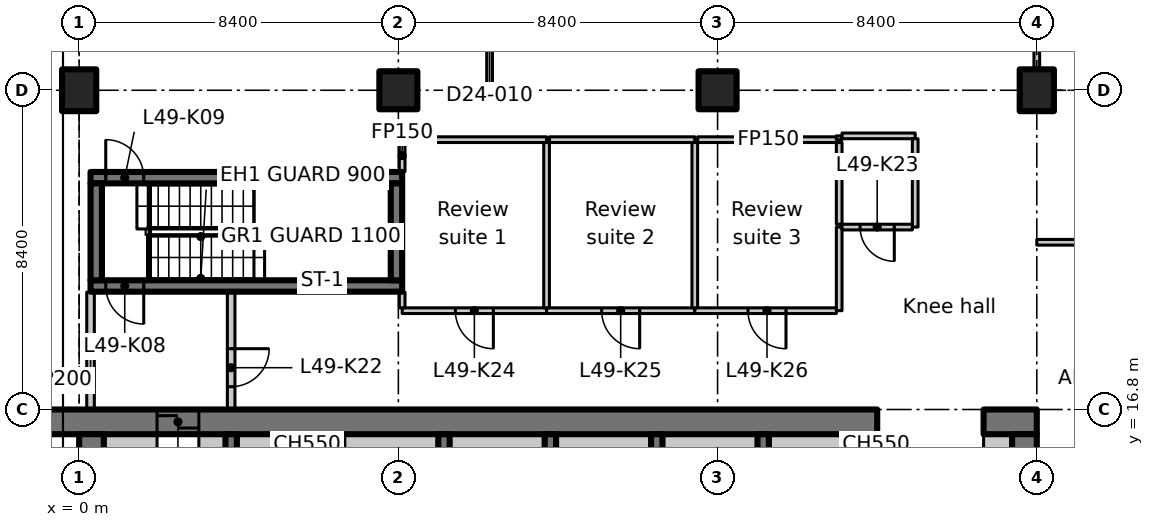
"""IFC4 building model, lengths in metres.
Left out: names, types, materials, properties, quantities, classifications, styles, units other than length and angle.
Written with IfcOpenShell. Run it as: python <this file> out.ifc"""

import sys

from ifc_helpers import new_model, si_unit, direction, frame, frame_2d, origin, origin_2d, place, context, subcontext, project, spatial, polyline, rectangle, outline, extrude, element, fill, save


model = new_model("IFC4")
c1 = context("Model", 3, precision=1e-05, world=origin(), true_north=direction((0.0, 1.0)))
c2 = subcontext(c1, "Body", "Model", "MODEL_VIEW")
j1 = project(units=[si_unit("LENGTHUNIT", "METRE"), si_unit("PLANEANGLEUNIT", "RADIAN")], contexts=[c1])
p1 = place(None, origin())
s1 = spatial("IfcSite", under=j1, at=p1, CompositionType="ELEMENT")
p2 = place(p1, origin())
s2 = spatial("IfcBuilding", under=s1, at=p2, CompositionType="ELEMENT")
p3 = place(p2, frame((0.0, 0.0, 195.6)))
s3 = spatial("IfcBuildingStorey", under=s2, at=p3, CompositionType="ELEMENT", Elevation=195.6)
p4 = place(p3, frame((0.0, 25.2, 0.0), z_axis=(0.0, 0.0, 1.0), x_axis=(1.0, 0.0, 0.0)))
e1 = element("IfcColumn", 1, at=p4, inside=s3, PredefinedType="COLUMN", context=c2, shape_type="SweptSolid", body=[
    extrude(rectangle(XDim=0.9, YDim=1.1, at=origin_2d()), origin(), (0.0, 0.0, 1.0), 3.35),
])
for number, where, z_axis, x_axis in (
    (2, (8.4, 25.2, 0.0), (0.0, 0.0, 1.0), (1.0, 0.0, 0.0)),
    (3, (16.8, 25.2, 0.0), (0.0, 0.0, 1.0), (1.0, 0.0, 0.0)),
):
    element("IfcColumn", number, at=place(p3, frame(where, z_axis=z_axis, x_axis=x_axis)), inside=s3, PredefinedType="COLUMN", context=c2, shape_type="SweptSolid", body=[
        extrude(rectangle(XDim=1.0, YDim=1.0, at=origin_2d()), origin(), (0.0, 0.0, 1.0), 3.35),
    ])
p5 = place(p3, frame((25.2, 25.2, 0.0), z_axis=(0.0, 0.0, 1.0), x_axis=(1.0, 0.0, 0.0)))
e4 = element("IfcColumn", 4, at=p5, inside=s3, PredefinedType="COLUMN", context=c2, shape_type="SweptSolid", body=[
    extrude(rectangle(XDim=0.9, YDim=1.1, at=origin_2d()), origin(), (0.0, 0.0, 1.0), 3.35),
])
p6 = place(p3, frame((-1.1, 16.475, 0.0), z_axis=(0.0, 0.0, 1.0), x_axis=(1.0, 0.0, 0.0)))
e5 = element("IfcWall", 5, at=p6, inside=s3, PredefinedType="SHEAR", context=c2, shape_type="SweptSolid", body=[
    extrude(rectangle(XDim=22.1, YDim=0.65, at=frame_2d((11.05, 0.0))), origin(), (0.0, 0.0, 1.0), 3.35),
])
p7 = place(p6, frame((3.15, 0.0, 0.0)))
e6 = element("IfcOpeningElement", 6, at=p7, cuts=e5, PredefinedType="OPENING", context=c2, shape_type="SweptSolid", body=[
    extrude(rectangle(XDim=1.1, YDim=2.3, at=frame_2d((0.55, 1.15))), frame((0.0, 0.335, 0.0), z_axis=(0.0, -1.0, 0.0), x_axis=(1.0, 0.0, 0.0)), (0.0, 0.0, 1.0), 0.67),
])
p8 = place(p3, frame((23.8, 16.475, 0.0), z_axis=(0.0, 0.0, 1.0), x_axis=(1.0, 0.0, 0.0)))
e7 = element("IfcWall", 7, at=p8, inside=s3, PredefinedType="SHEAR", context=c2, shape_type="SweptSolid", body=[
    extrude(rectangle(XDim=1.4, YDim=0.65, at=frame_2d((0.7, 0.0))), origin(), (0.0, 0.0, 1.0), 3.35),
])
p9 = place(p3, frame((0.325, 7.286, 0.0), z_axis=(0.0, 0.0, 1.0), x_axis=(0.0, 1.0, 0.0)))
e8 = element("IfcWall", 8, at=p9, inside=s3, PredefinedType="SHEAR", context=c2, shape_type="SweptSolid", body=[
    extrude(rectangle(XDim=8.864, YDim=0.65, at=frame_2d((4.432, 0.0))), origin(), (0.0, 0.0, 1.0), 3.35),
])
p10 = place(p3, frame((24.875, 12.6, 0.0), z_axis=(0.0, 0.0, 1.0), x_axis=(0.0, 1.0, 0.0)))
e9 = element("IfcWall", 9, at=p10, inside=s3, PredefinedType="SHEAR", context=c2, shape_type="SweptSolid", body=[
    extrude(rectangle(XDim=3.55, YDim=0.65, at=frame_2d((1.775, 0.0))), origin(), (0.0, 0.0, 1.0), 3.35),
])
p11 = place(p3, frame((0.65, 15.875, 0.0), z_axis=(0.0, 0.0, 1.0), x_axis=(1.0, 0.0, 0.0)))
e10 = element("IfcWall", 10, at=p11, inside=s3, PredefinedType="PARTITIONING", context=c2, shape_type="SweptSolid", body=[
    extrude(rectangle(XDim=1.4, YDim=0.55, at=frame_2d((0.7, 0.0))), origin(), (0.0, 0.0, 1.0), 3.35),
])
p12 = place(p3, frame((23.8, 15.875, 0.0), z_axis=(0.0, 0.0, 1.0), x_axis=(1.0, 0.0, 0.0)))
e11 = element("IfcWall", 11, at=p12, inside=s3, PredefinedType="PARTITIONING", context=c2, shape_type="SweptSolid", body=[
    extrude(rectangle(XDim=0.75, YDim=0.55, at=frame_2d((0.375, 0.0))), origin(), (0.0, 0.0, 1.0), 3.35),
])
for number, where, z_axis, x_axis in (
    (12, (4.0, 12.95, 0.0), (0.0, 0.0, 1.0), (0.0, 1.0, 0.0)),
    (13, (6.8, 12.95, 0.0), (0.0, 0.0, 1.0), (0.0, 1.0, 0.0)),
    (14, (9.6, 12.95, 0.0), (0.0, 0.0, 1.0), (0.0, 1.0, 0.0)),
    (15, (12.4, 12.95, 0.0), (0.0, 0.0, 1.0), (0.0, 1.0, 0.0)),
    (16, (15.2, 12.95, 0.0), (0.0, 0.0, 1.0), (0.0, 1.0, 0.0)),
    (17, (18.0, 12.95, 0.0), (0.0, 0.0, 1.0), (0.0, 1.0, 0.0)),
    (18, (20.8, 12.95, 0.0), (0.0, 0.0, 1.0), (0.0, 1.0, 0.0)),
):
    element("IfcWall", number, at=place(p3, frame(where, z_axis=z_axis, x_axis=x_axis)), inside=s3, PredefinedType="SHEAR", context=c2, shape_type="SweptSolid", body=[
        extrude(rectangle(XDim=3.2, YDim=0.3, at=frame_2d((1.6, 0.0))), origin(), (0.0, 0.0, 1.0), 3.35),
    ])
p13 = place(p3, frame((8.5, 20.05, 0.0), z_axis=(0.0, 0.0, 1.0), x_axis=(-1.0, 0.0, 0.0)))
e19 = element("IfcWall", 19, at=p13, inside=s3, PredefinedType="SHEAR", context=c2, shape_type="SweptSolid", body=[
    extrude(rectangle(XDim=8.2, YDim=0.3, at=frame_2d((4.1, 0.0))), origin(), (0.0, 0.0, 1.0), 3.35),
])
p14 = place(p13, frame((6.8, 0.0, 0.0)))
e20 = element("IfcOpeningElement", 20, at=p14, cuts=e19, PredefinedType="OPENING", context=c2, shape_type="SweptSolid", body=[
    extrude(rectangle(XDim=1.0, YDim=2.1, at=frame_2d((0.5, 1.05))), frame((0.0, 0.16, 0.0), z_axis=(0.0, -1.0, 0.0), x_axis=(1.0, 0.0, 0.0)), (0.0, 0.0, 1.0), 0.32),
])
p15 = place(p3, frame((0.3, 22.9, 0.0), z_axis=(0.0, 0.0, 1.0), x_axis=(1.0, 0.0, 0.0)))
e21 = element("IfcWall", 21, at=p15, inside=s3, PredefinedType="SHEAR", context=c2, shape_type="SweptSolid", body=[
    extrude(rectangle(XDim=8.2, YDim=0.3, at=frame_2d((4.1, 0.0))), origin(), (0.0, 0.0, 1.0), 3.35),
])
p16 = place(p15, frame((0.4, 0.0, 0.0)))
e22 = element("IfcOpeningElement", 22, at=p16, cuts=e21, PredefinedType="OPENING", context=c2, shape_type="SweptSolid", body=[
    extrude(rectangle(XDim=1.0, YDim=2.1, at=frame_2d((0.5, 1.05))), frame((0.0, 0.16, 0.0), z_axis=(0.0, -1.0, 0.0), x_axis=(1.0, 0.0, 0.0)), (0.0, 0.0, 1.0), 0.32),
])
for number, where, z_axis, x_axis in (
    (23, (0.45, 20.2, 0.0), (0.0, 0.0, 1.0), (0.0, 1.0, 0.0)),
    (24, (8.35, 20.2, 0.0), (0.0, 0.0, 1.0), (0.0, 1.0, 0.0)),
):
    element("IfcWall", number, at=place(p3, frame(where, z_axis=z_axis, x_axis=x_axis)), inside=s3, PredefinedType="SHEAR", context=c2, shape_type="SweptSolid", body=[
        extrude(rectangle(XDim=2.55, YDim=0.3, at=frame_2d((1.275, 0.0))), origin(), (0.0, 0.0, 1.0), 3.35),
    ])
p17 = place(p3, frame((0.3, 16.812, 0.0), z_axis=(0.0, 0.0, 1.0), x_axis=(0.0, 1.0, 0.0)))
e25 = element("IfcWall", 25, at=p17, inside=s3, PredefinedType="PARTITIONING", context=c2, shape_type="SweptSolid", body=[
    extrude(rectangle(XDim=3.076, YDim=0.2, at=frame_2d((1.538, 0.0))), origin(), (0.0, 0.0, 1.0), 2.98),
])
p18 = place(p3, frame((4.0, 19.888, 0.0), z_axis=(0.0, 0.0, 1.0), x_axis=(0.0, -1.0, 0.0)))
e26 = element("IfcWall", 26, at=p18, inside=s3, PredefinedType="PARTITIONING", context=c2, shape_type="SweptSolid", body=[
    extrude(rectangle(XDim=3.076, YDim=0.2, at=frame_2d((1.538, 0.0))), origin(), (0.0, 0.0, 1.0), 3.35),
])
p19 = place(p18, frame((1.488, 0.0, 0.0)))
e27 = element("IfcOpeningElement", 27, at=p19, cuts=e26, PredefinedType="OPENING", context=c2, shape_type="SweptSolid", body=[
    extrude(rectangle(XDim=1.0, YDim=2.1, at=frame_2d((0.5, 1.05))), frame((0.0, 0.11, 0.0), z_axis=(0.0, -1.0, 0.0), x_axis=(1.0, 0.0, 0.0)), (0.0, 0.0, 1.0), 0.22),
])
p20 = place(p3, frame((12.3, 19.4, 0.0), z_axis=(0.0, 0.0, 1.0), x_axis=(-1.0, 0.0, 0.0)))
e28 = element("IfcWall", 28, at=p20, inside=s3, PredefinedType="PARTITIONING", context=c2, shape_type="SweptSolid", body=[
    extrude(rectangle(XDim=3.8, YDim=0.15, at=frame_2d((1.9, 0.0))), origin(), (0.0, 0.0, 1.0), 3.35),
])
p21 = place(p20, frame((1.4, 0.0, 0.0)))
e29 = element("IfcOpeningElement", 29, at=p21, cuts=e28, PredefinedType="OPENING", context=c2, shape_type="SweptSolid", body=[
    extrude(rectangle(XDim=1.0, YDim=2.1, at=frame_2d((0.5, 1.05))), frame((0.0, 0.085, 0.0), z_axis=(0.0, -1.0, 0.0), x_axis=(1.0, 0.0, 0.0)), (0.0, 0.0, 1.0), 0.17),
])
p22 = place(p3, frame((8.5, 19.475, 0.0), z_axis=(0.0, 0.0, 1.0), x_axis=(0.0, 1.0, 0.0)))
e30 = element("IfcWall", 30, at=p22, inside=s3, PredefinedType="PARTITIONING", context=c2, shape_type="SweptSolid", body=[
    extrude(rectangle(XDim=0.413, YDim=0.15, at=frame_2d((0.207, 0.0))), origin(), (0.0, 0.0, 1.0), 3.35),
])
p23 = place(p3, frame((8.5, 23.062, 0.0), z_axis=(0.0, 0.0, 1.0), x_axis=(0.0, 1.0, 0.0)))
e31 = element("IfcWall", 31, at=p23, inside=s3, PredefinedType="PARTITIONING", context=c2, shape_type="SweptSolid", body=[
    extrude(rectangle(XDim=0.838, YDim=0.15, at=frame_2d((0.419, 0.0))), origin(), (0.0, 0.0, 1.0), 3.35),
])
p24 = place(p3, frame((8.575, 23.9, 0.0), z_axis=(0.0, 0.0, 1.0), x_axis=(1.0, 0.0, 0.0)))
e32 = element("IfcWall", 32, at=p24, inside=s3, PredefinedType="PARTITIONING", context=c2, shape_type="SweptSolid", body=[
    extrude(rectangle(XDim=3.725, YDim=0.15, at=frame_2d((1.863, 0.0))), origin(), (0.0, 0.0, 1.0), 3.35),
])
p25 = place(p3, frame((16.2, 19.4, 0.0), z_axis=(0.0, 0.0, 1.0), x_axis=(-1.0, 0.0, 0.0)))
e33 = element("IfcWall", 33, at=p25, inside=s3, PredefinedType="PARTITIONING", context=c2, shape_type="SweptSolid", body=[
    extrude(rectangle(XDim=3.9, YDim=0.15, at=frame_2d((1.95, 0.0))), origin(), (0.0, 0.0, 1.0), 3.35),
])
p26 = place(p25, frame((1.45, 0.0, 0.0)))
e34 = element("IfcOpeningElement", 34, at=p26, cuts=e33, PredefinedType="OPENING", context=c2, shape_type="SweptSolid", body=[
    extrude(rectangle(XDim=1.0, YDim=2.1, at=frame_2d((0.5, 1.05))), frame((0.0, 0.085, 0.0), z_axis=(0.0, -1.0, 0.0), x_axis=(1.0, 0.0, 0.0)), (0.0, 0.0, 1.0), 0.17),
])
p27 = place(p3, frame((12.3, 23.825, 0.0), z_axis=(0.0, 0.0, 1.0), x_axis=(0.0, -1.0, 0.0)))
e35 = element("IfcWall", 35, at=p27, inside=s3, PredefinedType="PARTITIONING", context=c2, shape_type="SweptSolid", body=[
    extrude(rectangle(XDim=4.35, YDim=0.15, at=frame_2d((2.175, 0.0))), origin(), (0.0, 0.0, 1.0), 3.35),
])
p28 = place(p3, frame((12.375, 23.9, 0.0), z_axis=(0.0, 0.0, 1.0), x_axis=(1.0, 0.0, 0.0)))
e36 = element("IfcWall", 36, at=p28, inside=s3, PredefinedType="PARTITIONING", context=c2, shape_type="SweptSolid", body=[
    extrude(rectangle(XDim=3.825, YDim=0.15, at=frame_2d((1.913, 0.0))), origin(), (0.0, 0.0, 1.0), 3.35),
])
p29 = place(p3, frame((20.0, 21.6, 0.0), z_axis=(0.0, 0.0, 1.0), x_axis=(0.0, -1.0, 0.0)))
e37 = element("IfcWall", 37, at=p29, inside=s3, PredefinedType="PARTITIONING", context=c2, shape_type="SweptSolid", body=[
    extrude(rectangle(XDim=2.2, YDim=0.15, at=frame_2d((1.1, 0.0))), origin(), (0.0, 0.0, 1.0), 3.35),
])
p30 = place(p3, frame((19.925, 19.4, 0.0), z_axis=(0.0, 0.0, 1.0), x_axis=(-1.0, 0.0, 0.0)))
e38 = element("IfcWall", 38, at=p30, inside=s3, PredefinedType="PARTITIONING", context=c2, shape_type="SweptSolid", body=[
    extrude(rectangle(XDim=3.725, YDim=0.15, at=frame_2d((1.863, 0.0))), origin(), (0.0, 0.0, 1.0), 3.35),
])
p31 = place(p30, frame((1.325, 0.0, 0.0)))
e39 = element("IfcOpeningElement", 39, at=p31, cuts=e38, PredefinedType="OPENING", context=c2, shape_type="SweptSolid", body=[
    extrude(rectangle(XDim=1.0, YDim=2.1, at=frame_2d((0.5, 1.05))), frame((0.0, 0.085, 0.0), z_axis=(0.0, -1.0, 0.0), x_axis=(1.0, 0.0, 0.0)), (0.0, 0.0, 1.0), 0.17),
])
p32 = place(p3, frame((16.2, 23.825, 0.0), z_axis=(0.0, 0.0, 1.0), x_axis=(0.0, -1.0, 0.0)))
e40 = element("IfcWall", 40, at=p32, inside=s3, PredefinedType="PARTITIONING", context=c2, shape_type="SweptSolid", body=[
    extrude(rectangle(XDim=4.35, YDim=0.15, at=frame_2d((2.175, 0.0))), origin(), (0.0, 0.0, 1.0), 3.35),
])
p33 = place(p3, frame((16.275, 23.9, 0.0), z_axis=(0.0, 0.0, 1.0), x_axis=(1.0, 0.0, 0.0)))
e41 = element("IfcWall", 41, at=p33, inside=s3, PredefinedType="PARTITIONING", context=c2, shape_type="SweptSolid", body=[
    extrude(rectangle(XDim=3.725, YDim=0.15, at=frame_2d((1.863, 0.0))), origin(), (0.0, 0.0, 1.0), 3.35),
])
p34 = place(p3, frame((20.0, 23.9, 0.0), z_axis=(0.0, 0.0, 1.0), x_axis=(0.0, 1.0, 0.0)))
e42 = element("IfcWall", 42, at=p34, inside=s3, PredefinedType="PARTITIONING", context=c2, shape_type="SweptSolid", body=[
    extrude(rectangle(XDim=0.1, YDim=0.15, at=frame_2d((0.05, 0.0))), origin(), (0.0, 0.0, 1.0), 3.35),
])
p35 = place(p3, frame((20.075, 24.0, 0.0), z_axis=(0.0, 0.0, 1.0), x_axis=(1.0, 0.0, 0.0)))
e43 = element("IfcWall", 43, at=p35, inside=s3, PredefinedType="PARTITIONING", context=c2, shape_type="SweptSolid", body=[
    extrude(rectangle(XDim=1.925, YDim=0.15, at=frame_2d((0.962, 0.0))), origin(), (0.0, 0.0, 1.0), 3.35),
])
p36 = place(p3, frame((22.0, 23.925, 0.0), z_axis=(0.0, 0.0, 1.0), x_axis=(0.0, -1.0, 0.0)))
e44 = element("IfcWall", 44, at=p36, inside=s3, PredefinedType="PARTITIONING", context=c2, shape_type="SweptSolid", body=[
    extrude(rectangle(XDim=2.325, YDim=0.15, at=frame_2d((1.163, 0.0))), origin(), (0.0, 0.0, 1.0), 3.35),
])
p37 = place(p3, frame((21.925, 21.6, 0.0), z_axis=(0.0, 0.0, 1.0), x_axis=(-1.0, 0.0, 0.0)))
e45 = element("IfcWall", 45, at=p37, inside=s3, PredefinedType="PARTITIONING", context=c2, shape_type="SweptSolid", body=[
    extrude(rectangle(XDim=1.85, YDim=0.15, at=frame_2d((0.925, 0.0))), origin(), (0.0, 0.0, 1.0), 3.35),
])
p38 = place(p37, frame((0.475, 0.0, 0.0)))
e46 = element("IfcOpeningElement", 46, at=p38, cuts=e45, PredefinedType="OPENING", context=c2, shape_type="SweptSolid", body=[
    extrude(rectangle(XDim=0.9, YDim=2.1, at=frame_2d((0.45, 1.05))), frame((0.0, 0.085, 0.0), z_axis=(0.0, -1.0, 0.0), x_axis=(1.0, 0.0, 0.0)), (0.0, 0.0, 1.0), 0.17),
])
p39 = place(p3, frame((20.0, 21.675, 0.0), z_axis=(0.0, 0.0, 1.0), x_axis=(0.0, 1.0, 0.0)))
e47 = element("IfcWall", 47, at=p39, inside=s3, PredefinedType="PARTITIONING", context=c2, shape_type="SweptSolid", body=[
    extrude(rectangle(XDim=2.15, YDim=0.15, at=frame_2d((1.075, 0.0))), origin(), (0.0, 0.0, 1.0), 3.35),
])
p40 = place(p3, frame((3.15, 15.875, 0.0), z_axis=(0.0, 0.0, 1.0), x_axis=(1.0, 0.0, 0.0)))
e48 = element("IfcWall", 48, at=p40, inside=s3, PredefinedType="PARTITIONING", context=c2, shape_type="SweptSolid", body=[
    extrude(rectangle(XDim=0.7, YDim=0.55, at=frame_2d((0.35, 0.0))), origin(), (0.0, 0.0, 1.0), 3.35),
])
for number, where, z_axis, x_axis in (
    (49, (4.15, 15.875, 0.0), (0.0, 0.0, 1.0), (1.0, 0.0, 0.0)),
    (50, (6.95, 15.875, 0.0), (0.0, 0.0, 1.0), (1.0, 0.0, 0.0)),
    (51, (9.75, 15.875, 0.0), (0.0, 0.0, 1.0), (1.0, 0.0, 0.0)),
    (52, (12.55, 15.875, 0.0), (0.0, 0.0, 1.0), (1.0, 0.0, 0.0)),
    (53, (15.35, 15.875, 0.0), (0.0, 0.0, 1.0), (1.0, 0.0, 0.0)),
    (54, (18.15, 15.875, 0.0), (0.0, 0.0, 1.0), (1.0, 0.0, 0.0)),
):
    element("IfcWall", number, at=place(p3, frame(where, z_axis=z_axis, x_axis=x_axis)), inside=s3, PredefinedType="PARTITIONING", context=c2, shape_type="SweptSolid", body=[
        extrude(rectangle(XDim=2.5, YDim=0.55, at=frame_2d((1.25, 0.0))), origin(), (0.0, 0.0, 1.0), 3.35),
    ])
p41 = place(p3, frame((20.95, 15.875, 0.0), z_axis=(0.0, 0.0, 1.0), x_axis=(1.0, 0.0, 0.0)))
e55 = element("IfcWall", 55, at=p41, inside=s3, PredefinedType="PARTITIONING", context=c2, shape_type="SweptSolid", body=[
    extrude(rectangle(XDim=0.05, YDim=0.55, at=frame_2d((0.025, 0.0))), origin(), (0.0, 0.0, 1.0), 3.35),
])
p42 = place(p3, frame((25.2, 21.2, 0.0), z_axis=(0.0, 0.0, 1.0), x_axis=(1.0, 0.0, 0.0)))
e56 = element("IfcWall", 56, at=p42, inside=s3, PredefinedType="PARTITIONING", context=c2, shape_type="SweptSolid", body=[
    extrude(rectangle(XDim=4.2, YDim=0.15, at=frame_2d((2.1, 0.0))), origin(), (0.0, 0.0, 1.0), 3.33),
])
p43 = place(p3, frame((25.2, 31.0, 0.0), z_axis=(0.0, 0.0, 1.0), x_axis=(0.0, -1.0, 0.0)))
e57 = element("IfcWall", 57, at=p43, inside=s3, PredefinedType="PARTITIONING", context=c2, shape_type="SweptSolid", body=[
    extrude(outline(polyline([(0.0, 0.0), (5.23, 0.0), (5.23, 2.98), (0.0, 2.98), (0.0, 0.0)])), frame((0.0, 0.075, 0.0), z_axis=(0.0, -1.0, 0.0), x_axis=(1.0, 0.0, 0.0)), (0.0, 0.0, 1.0), 0.15),
])
p44 = place(p43, frame((2.03, 0.0, 0.0)))
e58 = element("IfcOpeningElement", 58, at=p44, cuts=e57, PredefinedType="OPENING", context=c2, shape_type="SweptSolid", body=[
    extrude(rectangle(XDim=1.1, YDim=2.1, at=frame_2d((0.55, 1.05))), frame((0.0, 0.085, 0.0), z_axis=(0.0, -1.0, 0.0), x_axis=(1.0, 0.0, 0.0)), (0.0, 0.0, 1.0), 0.17),
])
p45 = place(p3, frame((10.8, 25.2, 0.0), z_axis=(0.0, 0.0, 1.0), x_axis=(0.0, 1.0, 0.0)))
e59 = element("IfcWall", 59, at=p45, inside=s3, PredefinedType="PARTITIONING", context=c2, shape_type="SweptSolid", body=[
    extrude(rectangle(XDim=4.2, YDim=0.15, at=frame_2d((2.1, 0.0))), origin(), (0.0, 0.0, 1.0), 3.33),
])
p46 = place(p45, frame((1.5, 0.0, 0.0)))
e60 = element("IfcOpeningElement", 60, at=p46, cuts=e59, PredefinedType="OPENING", context=c2, shape_type="SweptSolid", body=[
    extrude(rectangle(XDim=1.1, YDim=2.1, at=frame_2d((0.55, 1.05))), frame((0.0, 0.085, 0.0), z_axis=(0.0, -1.0, 0.0), x_axis=(1.0, 0.0, 0.0)), (0.0, 0.0, 1.0), 0.17),
])
p47 = place(p7, origin())
e61 = element("IfcDoor", 61, at=p47, inside=s3, OperationType="SLIDING_TO_LEFT", PredefinedType="DOOR", context=c2, shape_type="SweptSolid", body=[
    extrude(rectangle(XDim=1.1, YDim=2.3, at=frame_2d((0.55, 1.15))), frame((0.0, 0.025, 0.0), z_axis=(0.0, -1.0, 0.0), x_axis=(1.0, 0.0, 0.0)), (0.0, 0.0, 1.0), 0.05),
])
fill(e6, e61)
p48 = place(p14, origin())
e62 = element("IfcDoor", 62, at=p48, inside=s3, OperationType="SINGLE_SWING_RIGHT", PredefinedType="DOOR", context=c2, shape_type="SweptSolid", body=[
    extrude(rectangle(XDim=1.0, YDim=2.1, at=frame_2d((0.5, 1.05))), frame((0.0, 0.025, 0.0), z_axis=(0.0, -1.0, 0.0), x_axis=(1.0, 0.0, 0.0)), (0.0, 0.0, 1.0), 0.05),
])
fill(e20, e62)
p49 = place(p16, origin())
e63 = element("IfcDoor", 63, at=p49, inside=s3, OperationType="SINGLE_SWING_LEFT", PredefinedType="DOOR", context=c2, shape_type="SweptSolid", body=[
    extrude(rectangle(XDim=1.0, YDim=2.1, at=frame_2d((0.5, 1.05))), frame((0.0, 0.025, 0.0), z_axis=(0.0, -1.0, 0.0), x_axis=(1.0, 0.0, 0.0)), (0.0, 0.0, 1.0), 0.05),
])
fill(e22, e63)
p50 = place(p19, origin())
e64 = element("IfcDoor", 64, at=p50, inside=s3, OperationType="SINGLE_SWING_RIGHT", PredefinedType="DOOR", context=c2, shape_type="SweptSolid", body=[
    extrude(rectangle(XDim=1.0, YDim=2.1, at=frame_2d((0.5, 1.05))), frame((0.0, 0.025, 0.0), z_axis=(0.0, -1.0, 0.0), x_axis=(1.0, 0.0, 0.0)), (0.0, 0.0, 1.0), 0.05),
])
fill(e27, e64)
p51 = place(p38, origin())
e65 = element("IfcDoor", 65, at=p51, inside=s3, OperationType="SINGLE_SWING_LEFT", PredefinedType="DOOR", context=c2, shape_type="SweptSolid", body=[
    extrude(rectangle(XDim=0.9, YDim=2.1, at=frame_2d((0.45, 1.05))), frame((0.0, 0.025, 0.0), z_axis=(0.0, -1.0, 0.0), x_axis=(1.0, 0.0, 0.0)), (0.0, 0.0, 1.0), 0.05),
])
fill(e46, e65)
p52 = place(p21, origin())
e66 = element("IfcDoor", 66, at=p52, inside=s3, OperationType="SINGLE_SWING_RIGHT", PredefinedType="DOOR", context=c2, shape_type="SweptSolid", body=[
    extrude(rectangle(XDim=1.0, YDim=2.1, at=frame_2d((0.5, 1.05))), frame((0.0, 0.025, 0.0), z_axis=(0.0, -1.0, 0.0), x_axis=(1.0, 0.0, 0.0)), (0.0, 0.0, 1.0), 0.05),
])
fill(e29, e66)
p53 = place(p26, origin())
e67 = element("IfcDoor", 67, at=p53, inside=s3, OperationType="SINGLE_SWING_LEFT", PredefinedType="DOOR", context=c2, shape_type="SweptSolid", body=[
    extrude(rectangle(XDim=1.0, YDim=2.1, at=frame_2d((0.5, 1.05))), frame((0.0, 0.025, 0.0), z_axis=(0.0, -1.0, 0.0), x_axis=(1.0, 0.0, 0.0)), (0.0, 0.0, 1.0), 0.05),
])
fill(e34, e67)
p54 = place(p31, origin())
e68 = element("IfcDoor", 68, at=p54, inside=s3, OperationType="SINGLE_SWING_RIGHT", PredefinedType="DOOR", context=c2, shape_type="SweptSolid", body=[
    extrude(rectangle(XDim=1.0, YDim=2.1, at=frame_2d((0.5, 1.05))), frame((0.0, 0.025, 0.0), z_axis=(0.0, -1.0, 0.0), x_axis=(1.0, 0.0, 0.0)), (0.0, 0.0, 1.0), 0.05),
])
fill(e39, e68)
save(model, sys.argv[1])
